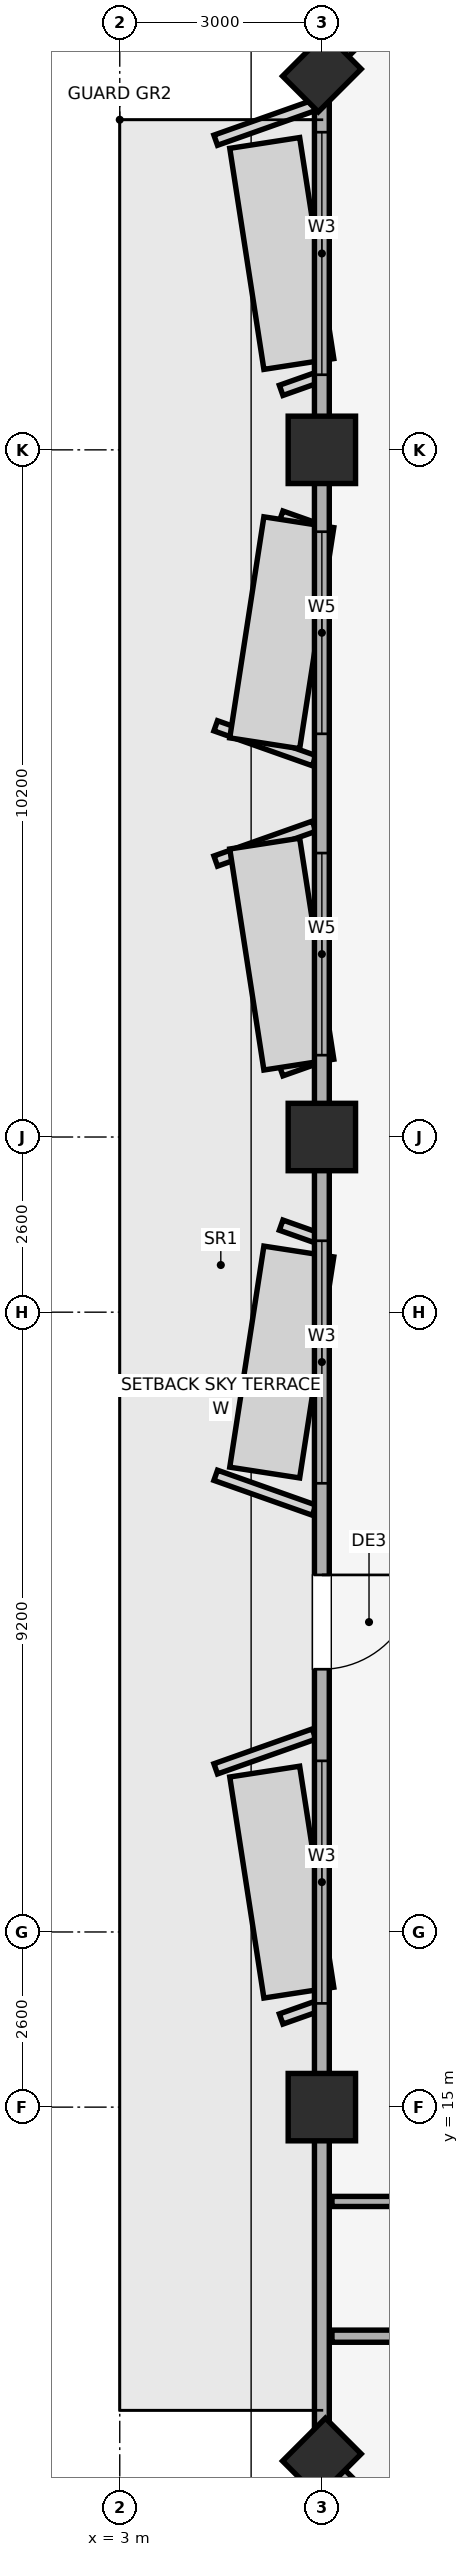
"""IFC4 building model, lengths in metres.
Left out: names, types, materials, properties, quantities, classifications, styles, units other than length and angle.
Written with IfcOpenShell. Run it as: python <this file> out.ifc"""

import sys

from ifc_helpers import new_model, si_unit, direction, frame, frame_2d, origin, origin_2d, place, context, subcontext, project, spatial, rectangle, extrude, element, fill, save


model = new_model("IFC4")
c1 = context("Model", 3, precision=1e-05, world=origin(), true_north=direction((0.0, 1.0)))
c2 = subcontext(c1, "Body", "Model", "MODEL_VIEW")
j1 = project(units=[si_unit("LENGTHUNIT", "METRE"), si_unit("PLANEANGLEUNIT", "RADIAN")], contexts=[c1])
p1 = place(None, origin())
s1 = spatial("IfcSite", under=j1, at=p1, CompositionType="ELEMENT")
p2 = place(p1, origin())
s2 = spatial("IfcBuilding", under=s1, at=p2, CompositionType="ELEMENT")
p3 = place(p2, frame((0.0, 0.0, 229.15)))
s3 = spatial("IfcBuildingStorey", under=s2, at=p3, CompositionType="ELEMENT", Elevation=229.15)
for number, where, z_axis, x_axis in (
    (1, (6.0, 15.0, 0.0), (0.0, 0.0, 1.0), (1.0, 0.0, 0.0)),
    (2, (6.0, 29.4, 0.0), (0.0, 0.0, 1.0), (1.0, 0.0, 0.0)),
    (3, (6.0, 39.6, 0.0), (0.0, 0.0, 1.0), (1.0, 0.0, 0.0)),
):
    element("IfcColumn", number, at=place(p3, frame(where, z_axis=z_axis, x_axis=x_axis)), inside=s3, PredefinedType="COLUMN", context=c2, shape_type="SweptSolid", body=[
        extrude(rectangle(XDim=1.0, YDim=1.0, at=origin_2d()), origin(), (0.0, 0.0, 1.0), 3.71),
    ])
for number, where, z_axis, x_axis in (
    (4, (6.0, 45.2, 0.0), (0.0, 0.0, 1.0), (0.707, 0.707, 0.0)),
    (5, (6.0, 9.8, 0.0), (0.0, 0.0, 1.0), (0.707, 0.707, 0.0)),
):
    element("IfcColumn", number, at=place(p3, frame(where, z_axis=z_axis, x_axis=x_axis)), inside=s3, PredefinedType="PILASTER", context=c2, shape_type="SweptSolid", body=[
        extrude(rectangle(XDim=0.9, YDim=0.75, at=origin_2d()), origin(), (0.0, 0.0, 1.0), 3.71),
    ])
p4 = place(p3, frame((9.8, 49.0, 0.0), z_axis=(0.0, 0.0, 1.0), x_axis=(-0.707106781187, -0.707106781187, 0.0)))
e6 = element("IfcWall", 6, at=p4, inside=s3, PredefinedType="SOLIDWALL", context=c2, shape_type="SweptSolid", body=[
    extrude(rectangle(XDim=5.374, YDim=0.22, at=frame_2d((2.687, 0.0))), origin(), (0.0, 0.0, 1.0), 2.91),
])
p5 = place(p4, frame((1.637, 0.0, 0.85)))
e7 = element("IfcOpeningElement", 7, at=p5, cuts=e6, PredefinedType="OPENING", context=c2, shape_type="SweptSolid", body=[
    extrude(rectangle(XDim=2.1, YDim=1.6, at=frame_2d((1.05, 0.8))), frame((0.0, 0.12, 0.0), z_axis=(0.0, -1.0, 0.0), x_axis=(1.0, 0.0, 0.0)), (0.0, 0.0, 1.0), 0.24),
])
p6 = place(p3, frame((6.0, 45.2, 0.0), z_axis=(0.0, 0.0, 1.0), x_axis=(0.0, -1.0, 0.0)))
e8 = element("IfcWall", 8, at=p6, inside=s3, PredefinedType="SOLIDWALL", context=c2, shape_type="SweptSolid", body=[
    extrude(rectangle(XDim=35.4, YDim=0.22, at=frame_2d((17.7, 0.0))), origin(), (0.0, 0.0, 1.0), 2.91),
])
p7 = place(p6, frame((22.3, 0.0, 0.0)))
e9 = element("IfcOpeningElement", 9, at=p7, cuts=e8, PredefinedType="OPENING", context=c2, shape_type="SweptSolid", body=[
    extrude(rectangle(XDim=1.4, YDim=2.2, at=frame_2d((0.7, 1.1))), frame((0.0, 0.12, 0.0), z_axis=(0.0, -1.0, 0.0), x_axis=(1.0, 0.0, 0.0)), (0.0, 0.0, 1.0), 0.24),
])
p8 = place(p6, frame((25.06, 0.0, 0.85)))
e10 = element("IfcOpeningElement", 10, at=p8, cuts=e8, PredefinedType="OPENING", context=c2, shape_type="SweptSolid", body=[
    extrude(rectangle(XDim=3.6, YDim=1.65, at=frame_2d((1.8, 0.825))), frame((0.0, 0.12, 0.0), z_axis=(0.0, -1.0, 0.0), x_axis=(1.0, 0.0, 0.0)), (0.0, 0.0, 1.0), 0.24),
])
p9 = place(p6, frame((17.34, 0.0, 0.85)))
e11 = element("IfcOpeningElement", 11, at=p9, cuts=e8, PredefinedType="OPENING", context=c2, shape_type="SweptSolid", body=[
    extrude(rectangle(XDim=3.6, YDim=1.65, at=frame_2d((1.8, 0.825))), frame((0.0, 0.12, 0.0), z_axis=(0.0, -1.0, 0.0), x_axis=(1.0, 0.0, 0.0)), (0.0, 0.0, 1.0), 0.24),
])
p10 = place(p6, frame((11.585, 0.0, 0.85)))
e12 = element("IfcOpeningElement", 12, at=p10, cuts=e8, PredefinedType="OPENING", context=c2, shape_type="SweptSolid", body=[
    extrude(rectangle(XDim=3.0, YDim=1.5, at=frame_2d((1.5, 0.75))), frame((0.0, 0.12, 0.0), z_axis=(0.0, -1.0, 0.0), x_axis=(1.0, 0.0, 0.0)), (0.0, 0.0, 1.0), 0.24),
])
p11 = place(p6, frame((6.815, 0.0, 0.85)))
e13 = element("IfcOpeningElement", 13, at=p11, cuts=e8, PredefinedType="OPENING", context=c2, shape_type="SweptSolid", body=[
    extrude(rectangle(XDim=3.0, YDim=1.5, at=frame_2d((1.5, 0.75))), frame((0.0, 0.12, 0.0), z_axis=(0.0, -1.0, 0.0), x_axis=(1.0, 0.0, 0.0)), (0.0, 0.0, 1.0), 0.24),
])
p12 = place(p6, frame((0.885, 0.0, 0.85)))
e14 = element("IfcOpeningElement", 14, at=p12, cuts=e8, PredefinedType="OPENING", context=c2, shape_type="SweptSolid", body=[
    extrude(rectangle(XDim=3.6, YDim=1.65, at=frame_2d((1.8, 0.825))), frame((0.0, 0.12, 0.0), z_axis=(0.0, -1.0, 0.0), x_axis=(1.0, 0.0, 0.0)), (0.0, 0.0, 1.0), 0.24),
])
p13 = place(p3, frame((6.0, 9.8, 0.0), z_axis=(0.0, 0.0, 1.0), x_axis=(0.707106781187, -0.707106781187, 0.0)))
e15 = element("IfcWall", 15, at=p13, inside=s3, PredefinedType="SOLIDWALL", context=c2, shape_type="SweptSolid", body=[
    extrude(rectangle(XDim=5.374, YDim=0.22, at=frame_2d((2.687, 0.0))), origin(), (0.0, 0.0, 1.0), 2.91),
])
p14 = place(p13, frame((1.637, 0.0, 0.85)))
e16 = element("IfcOpeningElement", 16, at=p14, cuts=e15, PredefinedType="OPENING", context=c2, shape_type="SweptSolid", body=[
    extrude(rectangle(XDim=2.1, YDim=1.6, at=frame_2d((1.05, 0.8))), frame((0.0, 0.12, 0.0), z_axis=(0.0, -1.0, 0.0), x_axis=(1.0, 0.0, 0.0)), (0.0, 0.0, 1.0), 0.24),
])
p15 = place(p3, frame((6.15, 11.6, 0.0), z_axis=(0.0, 0.0, 1.0), x_axis=(1.0, 0.0, 0.0)))
e17 = element("IfcWall", 17, at=p15, inside=s3, PredefinedType="PARTITIONING", context=c2, shape_type="SweptSolid", body=[
    extrude(rectangle(XDim=9.192, YDim=0.18, at=frame_2d((4.596, 0.0))), origin(), (0.0, 0.0, 1.0), 3.71),
])
p16 = place(p15, frame((4.55, 0.0, 0.0)))
e18 = element("IfcOpeningElement", 18, at=p16, cuts=e17, PredefinedType="OPENING", context=c2, shape_type="SweptSolid", body=[
    extrude(rectangle(XDim=1.0, YDim=2.15, at=frame_2d((0.5, 1.075))), frame((0.0, 0.1, 0.0), z_axis=(0.0, -1.0, 0.0), x_axis=(1.0, 0.0, 0.0)), (0.0, 0.0, 1.0), 0.2),
])
p17 = place(p3, frame((6.15, 13.6, 0.0), z_axis=(0.0, 0.0, 1.0), x_axis=(1.0, 0.0, 0.0)))
e19 = element("IfcWall", 19, at=p17, inside=s3, PredefinedType="PARTITIONING", context=c2, shape_type="SweptSolid", body=[
    extrude(rectangle(XDim=9.77, YDim=0.15, at=frame_2d((4.885, 0.0))), origin(), (0.0, 0.0, 1.0), 3.71),
])
p18 = place(p17, frame((6.13, 0.0, 0.0)))
e20 = element("IfcOpeningElement", 20, at=p18, cuts=e19, PredefinedType="OPENING", context=c2, shape_type="SweptSolid", body=[
    extrude(rectangle(XDim=1.5, YDim=2.25, at=frame_2d((0.75, 1.125))), frame((0.0, 0.085, 0.0), z_axis=(0.0, -1.0, 0.0), x_axis=(1.0, 0.0, 0.0)), (0.0, 0.0, 1.0), 0.17),
])
p19 = place(p7, origin())
e21 = element("IfcDoor", 21, at=p19, inside=s3, OperationType="SINGLE_SWING_LEFT", PredefinedType="DOOR", context=c2, shape_type="SweptSolid", body=[
    extrude(rectangle(XDim=1.4, YDim=2.2, at=frame_2d((0.7, 1.1))), frame((0.0, 0.025, 0.0), z_axis=(0.0, -1.0, 0.0), x_axis=(1.0, 0.0, 0.0)), (0.0, 0.0, 1.0), 0.05),
])
fill(e9, e21)
p20 = place(p8, origin())
e22 = element("IfcWindow", 22, at=p20, inside=s3, PartitioningType="SINGLE_PANEL", PredefinedType="WINDOW", context=c2, shape_type="SweptSolid", body=[
    extrude(rectangle(XDim=3.6, YDim=1.65, at=frame_2d((1.8, 0.825))), frame((0.0, 0.03, 0.0), z_axis=(0.0, -1.0, 0.0), x_axis=(1.0, 0.0, 0.0)), (0.0, 0.0, 1.0), 0.06),
])
fill(e10, e22)
p21 = place(p9, origin())
e23 = element("IfcWindow", 23, at=p21, inside=s3, PartitioningType="SINGLE_PANEL", PredefinedType="WINDOW", context=c2, shape_type="SweptSolid", body=[
    extrude(rectangle(XDim=3.6, YDim=1.65, at=frame_2d((1.8, 0.825))), frame((0.0, 0.03, 0.0), z_axis=(0.0, -1.0, 0.0), x_axis=(1.0, 0.0, 0.0)), (0.0, 0.0, 1.0), 0.06),
])
fill(e11, e23)
p22 = place(p10, origin())
e24 = element("IfcWindow", 24, at=p22, inside=s3, PartitioningType="SINGLE_PANEL", PredefinedType="WINDOW", context=c2, shape_type="SweptSolid", body=[
    extrude(rectangle(XDim=3.0, YDim=1.5, at=frame_2d((1.5, 0.75))), frame((0.0, 0.03, 0.0), z_axis=(0.0, -1.0, 0.0), x_axis=(1.0, 0.0, 0.0)), (0.0, 0.0, 1.0), 0.06),
])
fill(e12, e24)
p23 = place(p11, origin())
e25 = element("IfcWindow", 25, at=p23, inside=s3, PartitioningType="SINGLE_PANEL", PredefinedType="WINDOW", context=c2, shape_type="SweptSolid", body=[
    extrude(rectangle(XDim=3.0, YDim=1.5, at=frame_2d((1.5, 0.75))), frame((0.0, 0.03, 0.0), z_axis=(0.0, -1.0, 0.0), x_axis=(1.0, 0.0, 0.0)), (0.0, 0.0, 1.0), 0.06),
])
fill(e13, e25)
p24 = place(p12, origin())
e26 = element("IfcWindow", 26, at=p24, inside=s3, PartitioningType="SINGLE_PANEL", PredefinedType="WINDOW", context=c2, shape_type="SweptSolid", body=[
    extrude(rectangle(XDim=3.6, YDim=1.65, at=frame_2d((1.8, 0.825))), frame((0.0, 0.03, 0.0), z_axis=(0.0, -1.0, 0.0), x_axis=(1.0, 0.0, 0.0)), (0.0, 0.0, 1.0), 0.06),
])
fill(e14, e26)
save(model, sys.argv[1])
